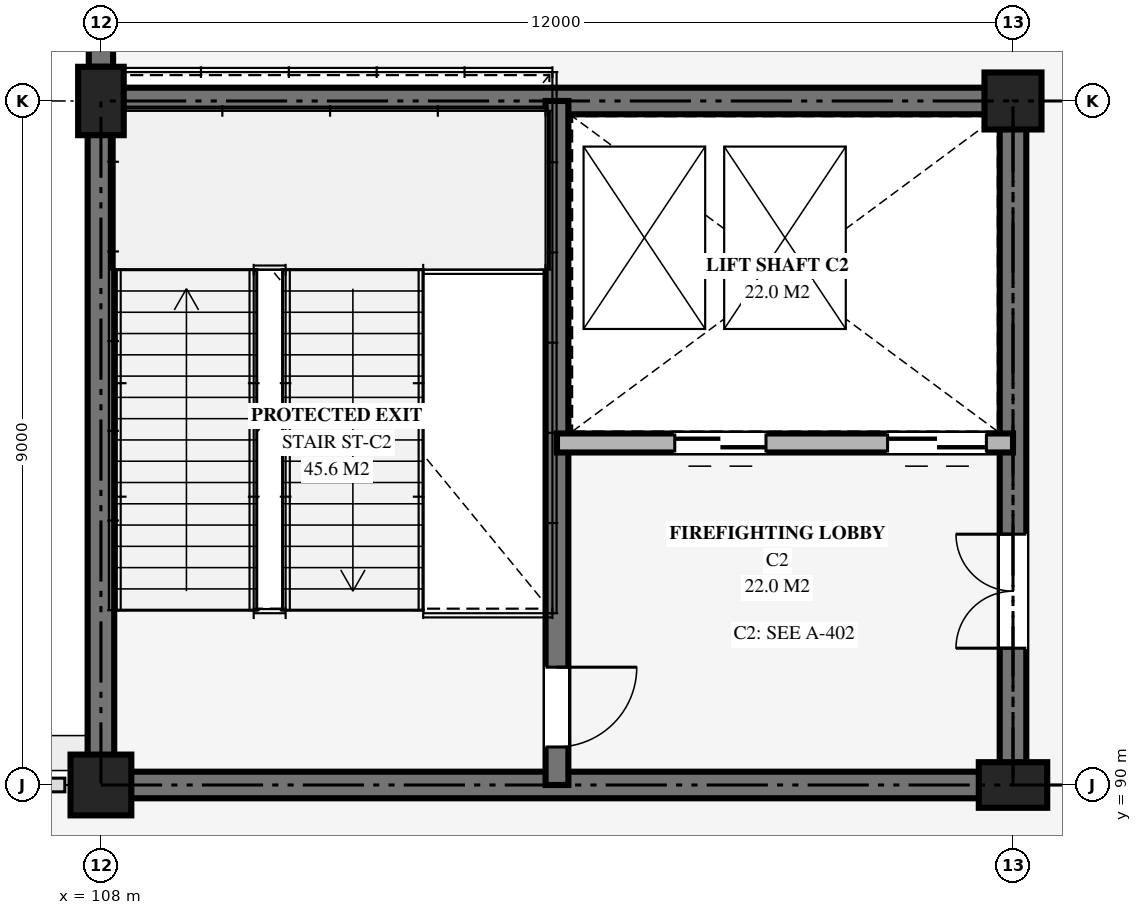
"""IFC4 building model, lengths in metres.
Left out: names, types, materials, properties, quantities, classifications, styles, units other than length and angle.
Written with IfcOpenShell. Run it as: python <this file> out.ifc"""

import sys

from ifc_helpers import new_model, si_unit, direction, frame, frame_2d, origin, origin_2d, place, context, subcontext, project, spatial, rectangle, circle, extrude, element, fill, save


model = new_model("IFC4")
c1 = context("Model", 3, precision=1e-05, world=origin(), true_north=direction((0.0, 1.0)))
c2 = subcontext(c1, "Body", "Model", "MODEL_VIEW")
j1 = project(units=[si_unit("LENGTHUNIT", "METRE"), si_unit("PLANEANGLEUNIT", "RADIAN")], contexts=[c1])
p1 = place(None, origin())
s1 = spatial("IfcSite", under=j1, at=p1, CompositionType="ELEMENT")
p2 = place(p1, origin())
s2 = spatial("IfcBuilding", under=s1, at=p2, CompositionType="ELEMENT")
p3 = place(p2, frame((0.0, 0.0, 5.4)))
s3 = spatial("IfcBuildingStorey", under=s2, at=p3, CompositionType="ELEMENT", Elevation=5.4)
p4 = place(p3, frame((108.0, 90.0, 0.0), z_axis=(0.0, 0.0, 1.0), x_axis=(1.0, 0.0, 0.0)))
e1 = element("IfcColumn", 1, at=p4, inside=s3, PredefinedType="COLUMN", context=c2, shape_type="SweptSolid", body=[
    extrude(circle(Radius=0.4, at=origin_2d()), origin(), (0.0, 0.0, 1.0), 4.8),
])
p5 = place(p3, frame((108.0, 99.0, 0.0), z_axis=(0.0, 0.0, 1.0), x_axis=(1.0, 0.0, 0.0)))
e2 = element("IfcColumn", 2, at=p5, inside=s3, PredefinedType="PILASTER", context=c2, shape_type="SweptSolid", body=[
    extrude(rectangle(XDim=0.6, YDim=0.9, at=origin_2d()), origin(), (0.0, 0.0, 1.0), 4.64),
])
p6 = place(p3, frame((120.0, 90.0, 0.0), z_axis=(0.0, 0.0, 1.0), x_axis=(0.0, 1.0, 0.0)))
e3 = element("IfcColumn", 3, at=p6, inside=s3, PredefinedType="PILASTER", context=c2, shape_type="SweptSolid", body=[
    extrude(rectangle(XDim=0.6, YDim=0.9, at=origin_2d()), origin(), (0.0, 0.0, 1.0), 4.8),
])
p7 = place(p3, frame((120.0, 99.0, 0.0), z_axis=(0.0, 0.0, 1.0), x_axis=(1.0, 0.0, 0.0)))
e4 = element("IfcColumn", 4, at=p7, inside=s3, PredefinedType="COLUMN", context=c2, shape_type="SweptSolid", body=[
    extrude(rectangle(XDim=0.75, YDim=0.75, at=origin_2d()), origin(), (0.0, 0.0, 1.0), 4.64),
])
p8 = place(p3, frame((108.0, 107.55, 0.0), z_axis=(0.0, 0.0, 1.0), x_axis=(0.0, -1.0, 0.0)))
e5 = element("IfcWall", 5, at=p8, inside=s3, PredefinedType="SOLIDWALL", context=c2, shape_type="SweptSolid", body=[
    extrude(rectangle(XDim=8.1, YDim=0.32, at=frame_2d((4.05, 0.0))), origin(), (0.0, 0.0, 1.0), 4.52),
])
p9 = place(p8, frame((3.05, 0.0, 2.85)))
e6 = element("IfcOpeningElement", 6, at=p9, cuts=e5, PredefinedType="OPENING", context=c2, shape_type="SweptSolid", body=[
    extrude(rectangle(XDim=2.0, YDim=1.2, at=frame_2d((1.0, 0.6))), frame((0.0, 0.17, 0.0), z_axis=(0.0, -1.0, 0.0), x_axis=(1.0, 0.0, 0.0)), (0.0, 0.0, 1.0), 0.34),
])
for number, where, z_axis, x_axis in (
    (7, (108.0, 90.0, 0.0), (0.0, 0.0, 1.0), (1.0, 0.0, 0.0)),
    (8, (108.0, 99.0, 0.0), (0.0, 0.0, 1.0), (1.0, 0.0, 0.0)),
):
    element("IfcWall", number, at=place(p3, frame(where, z_axis=z_axis, x_axis=x_axis)), inside=s3, PredefinedType="SHEAR", context=c2, shape_type="SweptSolid", body=[
        extrude(rectangle(XDim=12.0, YDim=0.35, at=frame_2d((6.0, 0.0))), origin(), (0.0, 0.0, 1.0), 4.78),
    ])
p10 = place(p3, frame((108.0, 90.0, 0.0), z_axis=(0.0, 0.0, 1.0), x_axis=(0.0, 1.0, 0.0)))
e9 = element("IfcWall", 9, at=p10, inside=s3, PredefinedType="SHEAR", context=c2, shape_type="SweptSolid", body=[
    extrude(rectangle(XDim=9.0, YDim=0.35, at=frame_2d((4.5, 0.0))), origin(), (0.0, 0.0, 1.0), 4.78),
])
p11 = place(p3, frame((120.0, 90.0, 0.0), z_axis=(0.0, 0.0, 1.0), x_axis=(0.0, 1.0, 0.0)))
e10 = element("IfcWall", 10, at=p11, inside=s3, PredefinedType="SHEAR", context=c2, shape_type="SweptSolid", body=[
    extrude(rectangle(XDim=9.0, YDim=0.35, at=frame_2d((4.5, 0.0))), origin(), (0.0, 0.0, 1.0), 4.78),
])
p12 = place(p11, frame((1.8, 0.0, 0.0)))
e11 = element("IfcOpeningElement", 11, at=p12, cuts=e10, PredefinedType="OPENING", context=c2, shape_type="SweptSolid", body=[
    extrude(rectangle(XDim=1.5, YDim=2.2, at=frame_2d((0.75, 1.1))), frame((0.0, 0.185, 0.0), z_axis=(0.0, -1.0, 0.0), x_axis=(1.0, 0.0, 0.0)), (0.0, 0.0, 1.0), 0.37),
])
p13 = place(p3, frame((114.0, 99.0, 0.0), z_axis=(0.0, 0.0, 1.0), x_axis=(0.0, -1.0, 0.0)))
e12 = element("IfcWall", 12, at=p13, inside=s3, PredefinedType="SHEAR", context=c2, shape_type="SweptSolid", body=[
    extrude(rectangle(XDim=9.0, YDim=0.3, at=frame_2d((4.5, 0.0))), origin(), (0.0, 0.0, 1.0), 4.78),
])
p14 = place(p13, frame((7.45, 0.0, 0.0)))
e13 = element("IfcOpeningElement", 13, at=p14, cuts=e12, PredefinedType="OPENING", context=c2, shape_type="SweptSolid", body=[
    extrude(rectangle(XDim=1.05, YDim=2.15, at=frame_2d((0.525, 1.075))), frame((0.0, 0.16, 0.0), z_axis=(0.0, -1.0, 0.0), x_axis=(1.0, 0.0, 0.0)), (0.0, 0.0, 1.0), 0.32),
])
p15 = place(p3, frame((120.0, 94.5, 0.0), z_axis=(0.0, 0.0, 1.0), x_axis=(-1.0, 0.0, 0.0)))
e14 = element("IfcWall", 14, at=p15, inside=s3, PredefinedType="SOLIDWALL", context=c2, shape_type="SweptSolid", body=[
    extrude(rectangle(XDim=6.0, YDim=0.25, at=frame_2d((3.0, 0.0))), origin(), (0.0, 0.0, 1.0), 3.65),
])
p16 = place(p15, frame((0.35, 0.0, 0.0)))
e15 = element("IfcOpeningElement", 15, at=p16, cuts=e14, PredefinedType="OPENING", context=c2, shape_type="SweptSolid", body=[
    extrude(rectangle(XDim=1.3, YDim=2.25, at=frame_2d((0.65, 1.125))), frame((0.0, 0.135, 0.0), z_axis=(0.0, -1.0, 0.0), x_axis=(1.0, 0.0, 0.0)), (0.0, 0.0, 1.0), 0.27),
])
p17 = place(p15, frame((3.25, 0.0, 0.0)))
e16 = element("IfcOpeningElement", 16, at=p17, cuts=e14, PredefinedType="OPENING", context=c2, shape_type="SweptSolid", body=[
    extrude(rectangle(XDim=1.2, YDim=2.2, at=frame_2d((0.6, 1.1))), frame((0.0, 0.135, 0.0), z_axis=(0.0, -1.0, 0.0), x_axis=(1.0, 0.0, 0.0)), (0.0, 0.0, 1.0), 0.27),
])
p18 = place(p16, origin())
e17 = element("IfcDoor", 17, at=p18, inside=s3, OperationType="DOUBLE_DOOR_SLIDING", PredefinedType="USERDEFINED", context=c2, shape_type="SweptSolid", body=[
    extrude(rectangle(XDim=1.3, YDim=2.25, at=frame_2d((0.65, 1.125))), frame((0.0, 0.025, 0.0), z_axis=(0.0, -1.0, 0.0), x_axis=(1.0, 0.0, 0.0)), (0.0, 0.0, 1.0), 0.05),
])
fill(e15, e17)
p19 = place(p17, origin())
e18 = element("IfcDoor", 18, at=p19, inside=s3, OperationType="DOUBLE_DOOR_SLIDING", PredefinedType="USERDEFINED", context=c2, shape_type="SweptSolid", body=[
    extrude(rectangle(XDim=1.2, YDim=2.2, at=frame_2d((0.6, 1.1))), frame((0.0, 0.025, 0.0), z_axis=(0.0, -1.0, 0.0), x_axis=(1.0, 0.0, 0.0)), (0.0, 0.0, 1.0), 0.05),
])
fill(e16, e18)
p20 = place(p14, origin())
e19 = element("IfcDoor", 19, at=p20, inside=s3, OperationType="SINGLE_SWING_LEFT", PredefinedType="DOOR", context=c2, shape_type="SweptSolid", body=[
    extrude(rectangle(XDim=1.05, YDim=2.15, at=frame_2d((0.525, 1.075))), frame((0.0, 0.025, 0.0), z_axis=(0.0, -1.0, 0.0), x_axis=(1.0, 0.0, 0.0)), (0.0, 0.0, 1.0), 0.05),
])
fill(e13, e19)
p21 = place(p12, origin())
e20 = element("IfcDoor", 20, at=p21, inside=s3, OperationType="DOUBLE_DOOR_SINGLE_SWING", PredefinedType="DOOR", context=c2, shape_type="SweptSolid", body=[
    extrude(rectangle(XDim=1.5, YDim=2.2, at=frame_2d((0.75, 1.1))), frame((0.0, 0.025, 0.0), z_axis=(0.0, -1.0, 0.0), x_axis=(1.0, 0.0, 0.0)), (0.0, 0.0, 1.0), 0.05),
])
fill(e11, e20)
save(model, sys.argv[1])
